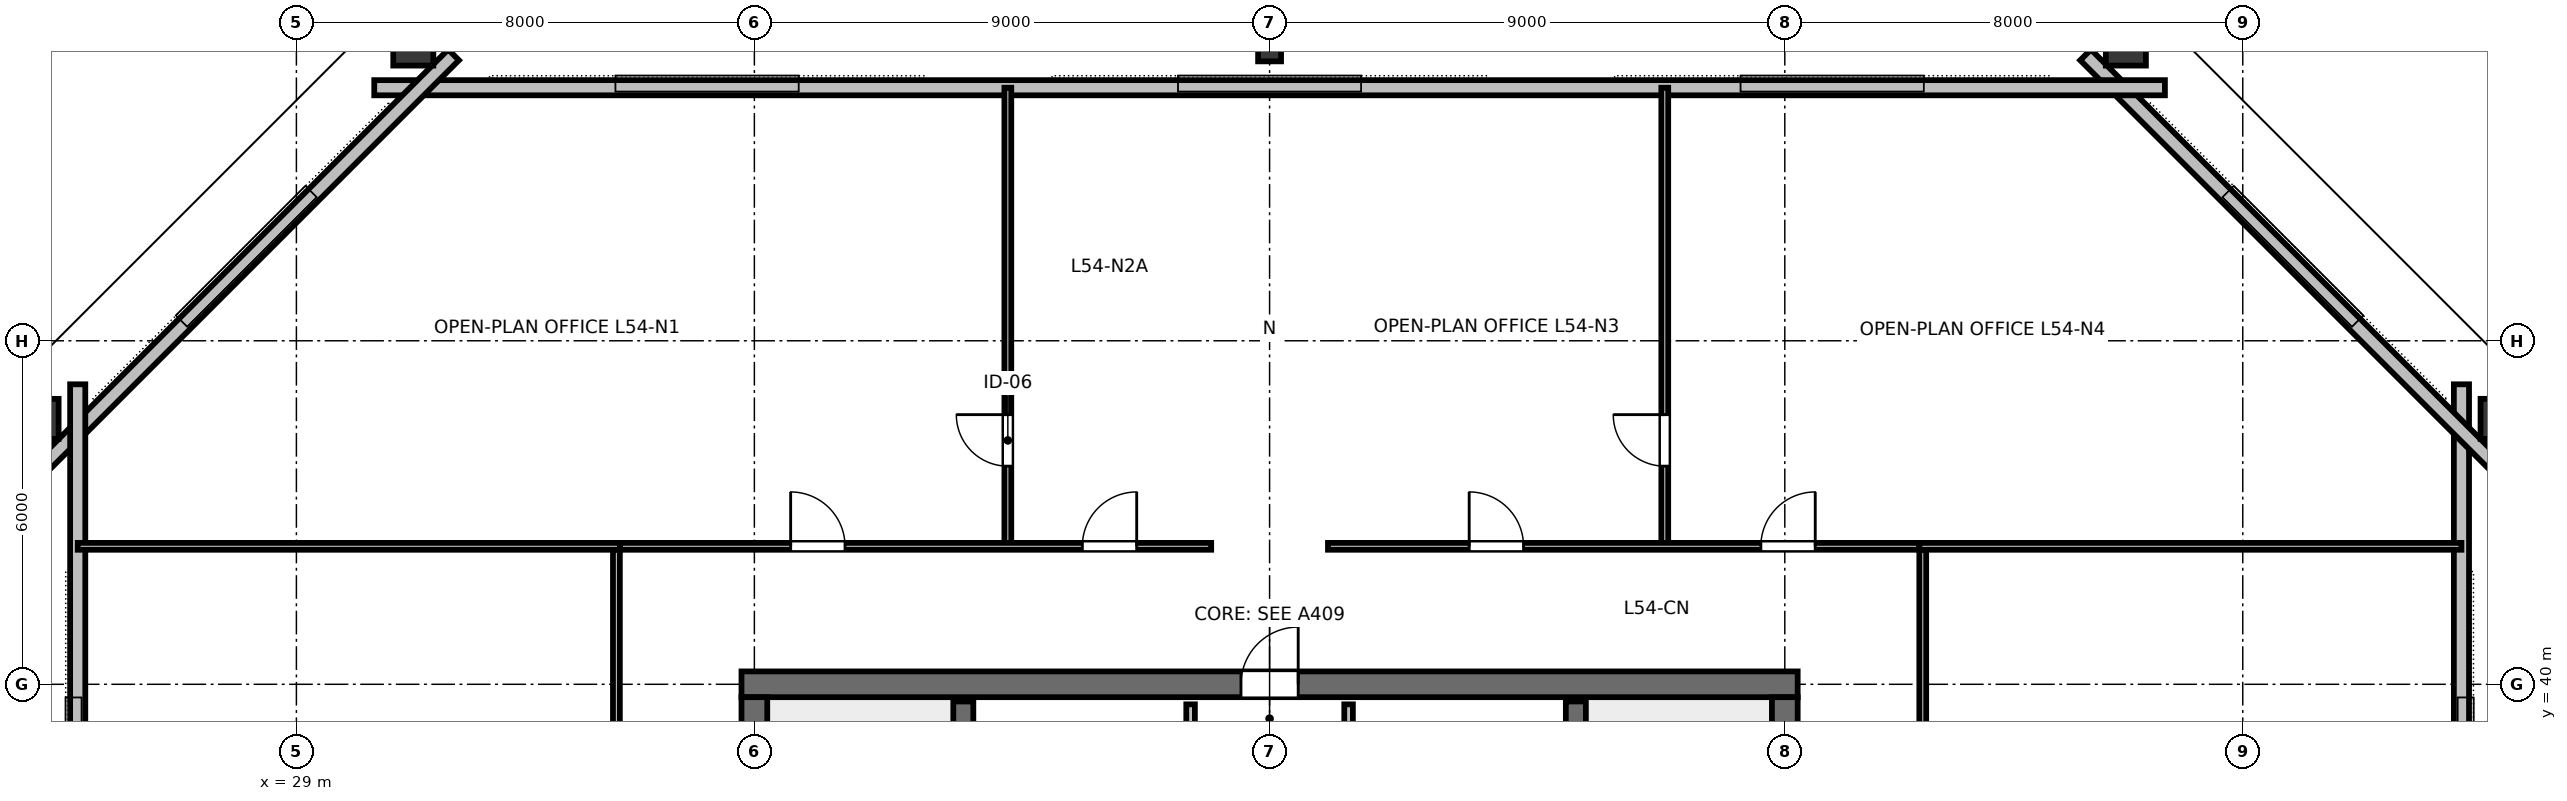
"""IFC4 building model, lengths in metres.
Left out: names, types, materials, properties, quantities, classifications, styles, units other than length and angle.
Written with IfcOpenShell. Run it as: python <this file> out.ifc"""

import sys

from ifc_helpers import new_model, si_unit, direction, frame, frame_2d, origin, origin_2d, place, context, subcontext, project, spatial, rectangle, hollow_rectangle, i_section, extrude, element, fill, save


model = new_model("IFC4")
c1 = context("Model", 3, precision=1e-05, world=origin(), true_north=direction((0.0, 1.0)))
c2 = subcontext(c1, "Body", "Model", "MODEL_VIEW")
j1 = project(units=[si_unit("LENGTHUNIT", "METRE"), si_unit("PLANEANGLEUNIT", "RADIAN")], contexts=[c1])
p1 = place(None, origin())
s1 = spatial("IfcSite", under=j1, at=p1, CompositionType="ELEMENT")
p2 = place(p1, origin())
s2 = spatial("IfcBuilding", under=s1, at=p2, CompositionType="ELEMENT")
p3 = place(p2, frame((0.0, 0.0, 205.8)))
s3 = spatial("IfcBuildingStorey", under=s2, at=p3, CompositionType="ELEMENT", Elevation=205.8)
p4 = place(p3, frame((36.775, 40.0, 0.0), z_axis=(0.0, 0.0, 1.0), x_axis=(1.0, 0.0, 0.0)))
e1 = element("IfcWall", 1, at=p4, inside=s3, PredefinedType="SHEAR", context=c2, shape_type="SweptSolid", body=[
    extrude(rectangle(XDim=18.45, YDim=0.45, at=frame_2d((9.225, 0.0))), origin(), (0.0, 0.0, 1.0), 3.36),
])
p5 = place(p4, frame((8.725, 0.0, 0.0)))
e2 = element("IfcOpeningElement", 2, at=p5, cuts=e1, PredefinedType="OPENING", context=c2, shape_type="SweptSolid", body=[
    extrude(rectangle(XDim=1.0, YDim=2.15, at=frame_2d((0.5, 1.075))), frame((0.0, 0.235, 0.0), z_axis=(0.0, -1.0, 0.0), x_axis=(1.0, 0.0, 0.0)), (0.0, 0.0, 1.0), 0.47),
])
p6 = place(p3, frame((37.0, 24.225, 0.0), z_axis=(0.0, 0.0, 1.0), x_axis=(0.0, 1.0, 0.0)))
e3 = element("IfcWall", 3, at=p6, inside=s3, PredefinedType="SHEAR", context=c2, shape_type="SweptSolid", body=[
    extrude(rectangle(XDim=15.55, YDim=0.45, at=frame_2d((7.775, 0.0))), origin(), (0.0, 0.0, 1.0), 3.36),
])
p7 = place(p6, frame((5.3, 0.0, 0.0)))
e4 = element("IfcOpeningElement", 4, at=p7, cuts=e3, PredefinedType="OPENING", context=c2, shape_type="SweptSolid", body=[
    extrude(rectangle(XDim=1.15, YDim=2.15, at=frame_2d((0.575, 1.075))), frame((0.0, 0.235, 0.0), z_axis=(0.0, -1.0, 0.0), x_axis=(1.0, 0.0, 0.0)), (0.0, 0.0, 1.0), 0.47),
])
p8 = place(p3, frame((55.0, 24.225, 0.0), z_axis=(0.0, 0.0, 1.0), x_axis=(0.0, 1.0, 0.0)))
e5 = element("IfcWall", 5, at=p8, inside=s3, PredefinedType="SHEAR", context=c2, shape_type="SweptSolid", body=[
    extrude(rectangle(XDim=15.55, YDim=0.45, at=frame_2d((7.775, 0.0))), origin(), (0.0, 0.0, 1.0), 3.36),
])
p9 = place(p8, frame((5.3, 0.0, 0.0)))
e6 = element("IfcOpeningElement", 6, at=p9, cuts=e5, PredefinedType="OPENING", context=c2, shape_type="SweptSolid", body=[
    extrude(rectangle(XDim=1.15, YDim=2.15, at=frame_2d((0.575, 1.075))), frame((0.0, 0.235, 0.0), z_axis=(0.0, -1.0, 0.0), x_axis=(1.0, 0.0, 0.0)), (0.0, 0.0, 1.0), 0.47),
])
p10 = place(p3, frame((67.579, 44.636, 0.0), z_axis=(-0.177376248603, -0.15599544782, 0.971701130333), x_axis=(0.729664280034, 0.64171109164, 0.236213702628)))
e7 = element("IfcColumn", 7, at=p10, inside=s3, PredefinedType="COLUMN", context=c2, shape_type="SweptSolid", body=[
    extrude(hollow_rectangle(XDim=0.7, YDim=0.85, WallThickness=0.04, at=origin_2d()), origin(), (0.0, 0.0, 1.0), 3.471),
])
p11 = place(p3, frame((60.958, 51.232, 0.0), z_axis=(-0.205843312043, -0.127115794881, 0.970293824354), x_axis=(0.52542489629, -0.850839983992, 0.0)))
e8 = element("IfcColumn", 8, at=p11, inside=s3, PredefinedType="COLUMN", context=c2, shape_type="SweptSolid", body=[
    extrude(hollow_rectangle(XDim=0.7, YDim=0.85, WallThickness=0.04, at=origin_2d()), origin(), (0.0, 0.0, 1.0), 3.476),
])
p12 = place(p3, frame((46.0, 51.08, 0.0), z_axis=(0.0, -0.128344855493, 0.99172959927), x_axis=(1.0, 0.0, 0.0)))
e9 = element("IfcColumn", 9, at=p12, inside=s3, PredefinedType="COLUMN", context=c2, shape_type="SweptSolid", body=[
    extrude(i_section(OverallWidth=0.401, OverallDepth=0.399, WebThickness=0.025, FlangeThickness=0.04, FilletRadius=0.025, at=origin_2d()), origin(), (0.0, 0.0, 1.0), 3.401),
])
p13 = place(p3, frame((31.042, 51.232, 0.0), z_axis=(0.205843312043, -0.127115794881, 0.970293824354), x_axis=(0.52542489629, 0.850839983992, 0.0)))
e10 = element("IfcColumn", 10, at=p13, inside=s3, PredefinedType="COLUMN", context=c2, shape_type="SweptSolid", body=[
    extrude(hollow_rectangle(XDim=0.7, YDim=0.85, WallThickness=0.04, at=origin_2d()), origin(), (0.0, 0.0, 1.0), 3.476),
])
p14 = place(p3, frame((24.421, 44.636, 0.0), z_axis=(0.177376248603, -0.15599544782, 0.971701130333), x_axis=(-0.729664280034, 0.64171109164, 0.236213702628)))
e11 = element("IfcColumn", 11, at=p14, inside=s3, PredefinedType="COLUMN", context=c2, shape_type="SweptSolid", body=[
    extrude(hollow_rectangle(XDim=0.7, YDim=0.85, WallThickness=0.04, at=origin_2d()), origin(), (0.0, 0.0, 1.0), 3.471),
])
p15 = place(p3, frame((66.82, 18.76, 0.0), z_axis=(0.0, 0.0, 1.0), x_axis=(0.0, 1.0, 0.0)))
e12 = element("IfcWall", 12, at=p15, inside=s3, PredefinedType="STANDARD", context=c2, shape_type="SweptSolid", body=[
    extrude(rectangle(XDim=26.48, YDim=0.265, at=frame_2d((13.24, 0.0))), origin(), (0.0, 0.0, 1.0), 2.832),
])
p16 = place(p3, frame((67.394, 43.854, 0.0), z_axis=(0.0, 0.0, 1.0), x_axis=(-0.707106781187, 0.707106781187, 0.0)))
e13 = element("IfcWall", 13, at=p16, inside=s3, PredefinedType="STANDARD", context=c2, shape_type="SweptSolid", body=[
    extrude(rectangle(XDim=10.097, YDim=0.265, at=frame_2d((5.048, 0.0))), origin(), (0.0, 0.0, 1.0), 2.832),
])
p17 = place(p3, frame((61.64, 50.42, 0.0), z_axis=(0.0, 0.0, 1.0), x_axis=(-1.0, 0.0, 0.0)))
e14 = element("IfcWall", 14, at=p17, inside=s3, PredefinedType="STANDARD", context=c2, shape_type="SweptSolid", body=[
    extrude(rectangle(XDim=31.28, YDim=0.265, at=frame_2d((15.64, 0.0))), origin(), (0.0, 0.0, 1.0), 2.832),
])
p18 = place(p3, frame((31.746, 50.994, 0.0), z_axis=(0.0, 0.0, 1.0), x_axis=(-0.707106781187, -0.707106781187, 0.0)))
e15 = element("IfcWall", 15, at=p18, inside=s3, PredefinedType="STANDARD", context=c2, shape_type="SweptSolid", body=[
    extrude(rectangle(XDim=10.097, YDim=0.265, at=frame_2d((5.048, 0.0))), origin(), (0.0, 0.0, 1.0), 2.832),
])
p19 = place(p3, frame((25.18, 45.24, 0.0), z_axis=(0.0, 0.0, 1.0), x_axis=(0.0, -1.0, 0.0)))
e16 = element("IfcWall", 16, at=p19, inside=s3, PredefinedType="STANDARD", context=c2, shape_type="SweptSolid", body=[
    extrude(rectangle(XDim=26.48, YDim=0.265, at=frame_2d((13.24, 0.0))), origin(), (0.0, 0.0, 1.0), 2.832),
])
for number, where, z_axis, x_axis in (
    (17, (40.65, 32.0, 0.0), (0.0, 0.0, 1.0), (0.0, 1.0, 0.0)),
    (18, (51.35, 32.0, 0.0), (0.0, 0.0, 1.0), (0.0, 1.0, 0.0)),
):
    element("IfcWall", number, at=place(p3, frame(where, z_axis=z_axis, x_axis=x_axis)), inside=s3, PredefinedType="SHEAR", context=c2, shape_type="SweptSolid", body=[
        extrude(rectangle(XDim=7.7, YDim=0.35, at=frame_2d((3.85, 0.0))), origin(), (0.0, 0.0, 1.0), 3.6),
    ])
p20 = place(p3, frame((44.62, 35.72, 0.0), z_axis=(0.0, 0.0, 1.0), x_axis=(0.0, 1.0, 0.0)))
e19 = element("IfcWall", 19, at=p20, inside=s3, PredefinedType="PARTITIONING", context=c2, shape_type="SweptSolid", body=[
    extrude(rectangle(XDim=3.93, YDim=0.15, at=frame_2d((1.965, 0.0))), origin(), (0.0, 0.0, 1.0), 3.375),
])
p21 = place(p20, frame((1.5, 0.0, 0.0)))
e20 = element("IfcOpeningElement", 20, at=p21, cuts=e19, PredefinedType="OPENING", context=c2, shape_type="SweptSolid", body=[
    extrude(rectangle(XDim=0.9, YDim=2.15, at=frame_2d((0.45, 1.075))), frame((0.0, 0.085, 0.0), z_axis=(0.0, -1.0, 0.0), x_axis=(1.0, 0.0, 0.0)), (0.0, 0.0, 1.0), 0.17),
])
p22 = place(p3, frame((47.38, 35.72, 0.0), z_axis=(0.0, 0.0, 1.0), x_axis=(0.0, 1.0, 0.0)))
e21 = element("IfcWall", 21, at=p22, inside=s3, PredefinedType="PARTITIONING", context=c2, shape_type="SweptSolid", body=[
    extrude(rectangle(XDim=3.93, YDim=0.15, at=frame_2d((1.965, 0.0))), origin(), (0.0, 0.0, 1.0), 3.375),
])
p23 = place(p22, frame((1.5, 0.0, 0.0)))
e22 = element("IfcOpeningElement", 22, at=p23, cuts=e21, PredefinedType="OPENING", context=c2, shape_type="SweptSolid", body=[
    extrude(rectangle(XDim=0.9, YDim=2.15, at=frame_2d((0.45, 1.075))), frame((0.0, 0.085, 0.0), z_axis=(0.0, -1.0, 0.0), x_axis=(1.0, 0.0, 0.0)), (0.0, 0.0, 1.0), 0.17),
])
p24 = place(p3, frame((41.428, 42.41, 0.0), z_axis=(0.0, 0.0, 1.0), x_axis=(0.0, 1.0, 0.0)))
e23 = element("IfcWall", 23, at=p24, inside=s3, PredefinedType="PARTITIONING", context=c2, shape_type="SweptSolid", body=[
    extrude(rectangle(XDim=8.01, YDim=0.12, at=frame_2d((4.005, 0.0))), origin(), (0.0, 0.0, 1.0), 2.655),
])
p25 = place(p24, frame((1.4, 0.0, 0.0)))
e24 = element("IfcOpeningElement", 24, at=p25, cuts=e23, PredefinedType="OPENING", context=c2, shape_type="SweptSolid", body=[
    extrude(rectangle(XDim=0.9, YDim=2.15, at=frame_2d((0.45, 1.075))), frame((0.0, 0.07, 0.0), z_axis=(0.0, -1.0, 0.0), x_axis=(1.0, 0.0, 0.0)), (0.0, 0.0, 1.0), 0.14),
])
p26 = place(p3, frame((52.903, 42.41, 0.0), z_axis=(0.0, 0.0, 1.0), x_axis=(0.0, 1.0, 0.0)))
e25 = element("IfcWall", 25, at=p26, inside=s3, PredefinedType="PARTITIONING", context=c2, shape_type="SweptSolid", body=[
    extrude(rectangle(XDim=8.01, YDim=0.12, at=frame_2d((4.005, 0.0))), origin(), (0.0, 0.0, 1.0), 2.655),
])
p27 = place(p26, frame((1.4, 0.0, 0.0)))
e26 = element("IfcOpeningElement", 26, at=p27, cuts=e25, PredefinedType="OPENING", context=c2, shape_type="SweptSolid", body=[
    extrude(rectangle(XDim=0.9, YDim=2.15, at=frame_2d((0.45, 1.075))), frame((0.0, 0.07, 0.0), z_axis=(0.0, -1.0, 0.0), x_axis=(1.0, 0.0, 0.0)), (0.0, 0.0, 1.0), 0.14),
])
p28 = place(p3, frame((34.65, 42.41, 0.0), z_axis=(0.0, 0.0, 1.0), x_axis=(1.0, 0.0, 0.0)))
e27 = element("IfcWall", 27, at=p28, inside=s3, PredefinedType="PARTITIONING", context=c2, shape_type="SweptSolid", body=[
    extrude(rectangle(XDim=10.33, YDim=0.12, at=frame_2d((5.165, 0.0))), origin(), (0.0, 0.0, 1.0), 2.655),
])
p29 = place(p28, frame((2.984, 0.0, 0.0)))
e28 = element("IfcOpeningElement", 28, at=p29, cuts=e27, PredefinedType="OPENING", context=c2, shape_type="SweptSolid", body=[
    extrude(rectangle(XDim=0.95, YDim=2.15, at=frame_2d((0.475, 1.075))), frame((0.0, 0.07, 0.0), z_axis=(0.0, -1.0, 0.0), x_axis=(1.0, 0.0, 0.0)), (0.0, 0.0, 1.0), 0.14),
])
p30 = place(p28, frame((8.079, 0.0, 0.0)))
e29 = element("IfcOpeningElement", 29, at=p30, cuts=e27, PredefinedType="OPENING", context=c2, shape_type="SweptSolid", body=[
    extrude(rectangle(XDim=0.95, YDim=2.15, at=frame_2d((0.475, 1.075))), frame((0.0, 0.07, 0.0), z_axis=(0.0, -1.0, 0.0), x_axis=(1.0, 0.0, 0.0)), (0.0, 0.0, 1.0), 0.14),
])
p31 = place(p3, frame((47.02, 42.41, 0.0), z_axis=(0.0, 0.0, 1.0), x_axis=(1.0, 0.0, 0.0)))
e30 = element("IfcWall", 30, at=p31, inside=s3, PredefinedType="PARTITIONING", context=c2, shape_type="SweptSolid", body=[
    extrude(rectangle(XDim=10.33, YDim=0.12, at=frame_2d((5.165, 0.0))), origin(), (0.0, 0.0, 1.0), 2.655),
])
p32 = place(p31, frame((2.467, 0.0, 0.0)))
e31 = element("IfcOpeningElement", 31, at=p32, cuts=e30, PredefinedType="OPENING", context=c2, shape_type="SweptSolid", body=[
    extrude(rectangle(XDim=0.95, YDim=2.15, at=frame_2d((0.475, 1.075))), frame((0.0, 0.07, 0.0), z_axis=(0.0, -1.0, 0.0), x_axis=(1.0, 0.0, 0.0)), (0.0, 0.0, 1.0), 0.14),
])
p33 = place(p31, frame((7.562, 0.0, 0.0)))
e32 = element("IfcOpeningElement", 32, at=p33, cuts=e30, PredefinedType="OPENING", context=c2, shape_type="SweptSolid", body=[
    extrude(rectangle(XDim=0.95, YDim=2.15, at=frame_2d((0.475, 1.075))), frame((0.0, 0.07, 0.0), z_axis=(0.0, -1.0, 0.0), x_axis=(1.0, 0.0, 0.0)), (0.0, 0.0, 1.0), 0.14),
])
p34 = place(p3, frame((34.59, 21.65, 0.0), z_axis=(0.0, 0.0, 1.0), x_axis=(0.0, 1.0, 0.0)))
e33 = element("IfcWall", 33, at=p34, inside=s3, PredefinedType="PARTITIONING", context=c2, shape_type="SweptSolid", body=[
    extrude(rectangle(XDim=20.7, YDim=0.12, at=frame_2d((10.35, 0.0))), origin(), (0.0, 0.0, 1.0), 2.655),
])
p35 = place(p34, frame((2.698, 0.0, 0.0)))
e34 = element("IfcOpeningElement", 34, at=p35, cuts=e33, PredefinedType="OPENING", context=c2, shape_type="SweptSolid", body=[
    extrude(rectangle(XDim=0.95, YDim=2.15, at=frame_2d((0.475, 1.075))), frame((0.0, 0.07, 0.0), z_axis=(0.0, -1.0, 0.0), x_axis=(1.0, 0.0, 0.0)), (0.0, 0.0, 1.0), 0.14),
])
p36 = place(p34, frame((8.556, 0.0, 0.0)))
e35 = element("IfcOpeningElement", 35, at=p36, cuts=e33, PredefinedType="OPENING", context=c2, shape_type="SweptSolid", body=[
    extrude(rectangle(XDim=0.95, YDim=2.15, at=frame_2d((0.475, 1.075))), frame((0.0, 0.07, 0.0), z_axis=(0.0, -1.0, 0.0), x_axis=(1.0, 0.0, 0.0)), (0.0, 0.0, 1.0), 0.14),
])
p37 = place(p34, frame((15.733, 0.0, 0.0)))
e36 = element("IfcOpeningElement", 36, at=p37, cuts=e33, PredefinedType="OPENING", context=c2, shape_type="SweptSolid", body=[
    extrude(rectangle(XDim=0.95, YDim=2.15, at=frame_2d((0.475, 1.075))), frame((0.0, 0.07, 0.0), z_axis=(0.0, -1.0, 0.0), x_axis=(1.0, 0.0, 0.0)), (0.0, 0.0, 1.0), 0.14),
])
p38 = place(p3, frame((57.41, 21.65, 0.0), z_axis=(0.0, 0.0, 1.0), x_axis=(0.0, 1.0, 0.0)))
e37 = element("IfcWall", 37, at=p38, inside=s3, PredefinedType="PARTITIONING", context=c2, shape_type="SweptSolid", body=[
    extrude(rectangle(XDim=20.7, YDim=0.12, at=frame_2d((10.35, 0.0))), origin(), (0.0, 0.0, 1.0), 2.655),
])
p39 = place(p38, frame((5.525, 0.0, 0.0)))
e38 = element("IfcOpeningElement", 38, at=p39, cuts=e37, PredefinedType="OPENING", context=c2, shape_type="SweptSolid", body=[
    extrude(rectangle(XDim=0.95, YDim=2.15, at=frame_2d((0.475, 1.075))), frame((0.0, 0.07, 0.0), z_axis=(0.0, -1.0, 0.0), x_axis=(1.0, 0.0, 0.0)), (0.0, 0.0, 1.0), 0.14),
])
p40 = place(p38, frame((15.675, 0.0, 0.0)))
e39 = element("IfcOpeningElement", 39, at=p40, cuts=e37, PredefinedType="OPENING", context=c2, shape_type="SweptSolid", body=[
    extrude(rectangle(XDim=0.95, YDim=2.15, at=frame_2d((0.475, 1.075))), frame((0.0, 0.07, 0.0), z_axis=(0.0, -1.0, 0.0), x_axis=(1.0, 0.0, 0.0)), (0.0, 0.0, 1.0), 0.14),
])
for number, where, z_axis, x_axis in (
    (40, (34.65, 42.41, 0.0), (0.0, 0.0, 1.0), (-1.0, 0.0, 0.0)),
    (41, (57.35, 42.41, 0.0), (0.0, 0.0, 1.0), (1.0, 0.0, 0.0)),
):
    element("IfcWall", number, at=place(p3, frame(where, z_axis=z_axis, x_axis=x_axis)), inside=s3, PredefinedType="PARTITIONING", context=c2, shape_type="SweptSolid", body=[
        extrude(rectangle(XDim=9.47, YDim=0.12, at=frame_2d((4.735, 0.0))), origin(), (0.0, 0.0, 1.0), 2.655),
    ])
p41 = place(p5, origin())
e42 = element("IfcDoor", 42, at=p41, inside=s3, OperationType="SINGLE_SWING_RIGHT", PredefinedType="DOOR", context=c2, shape_type="SweptSolid", body=[
    extrude(rectangle(XDim=1.0, YDim=2.15, at=frame_2d((0.5, 1.075))), frame((0.0, 0.025, 0.0), z_axis=(0.0, -1.0, 0.0), x_axis=(1.0, 0.0, 0.0)), (0.0, 0.0, 1.0), 0.05),
])
fill(e2, e42)
p42 = place(p25, origin())
e43 = element("IfcDoor", 43, at=p42, inside=s3, OperationType="SINGLE_SWING_RIGHT", PredefinedType="DOOR", context=c2, shape_type="SweptSolid", body=[
    extrude(rectangle(XDim=0.9, YDim=2.15, at=frame_2d((0.45, 1.075))), frame((0.0, 0.025, 0.0), z_axis=(0.0, -1.0, 0.0), x_axis=(1.0, 0.0, 0.0)), (0.0, 0.0, 1.0), 0.05),
])
fill(e24, e43)
p43 = place(p27, origin())
e44 = element("IfcDoor", 44, at=p43, inside=s3, OperationType="SINGLE_SWING_RIGHT", PredefinedType="DOOR", context=c2, shape_type="SweptSolid", body=[
    extrude(rectangle(XDim=0.9, YDim=2.15, at=frame_2d((0.45, 1.075))), frame((0.0, 0.025, 0.0), z_axis=(0.0, -1.0, 0.0), x_axis=(1.0, 0.0, 0.0)), (0.0, 0.0, 1.0), 0.05),
])
fill(e26, e44)
p44 = place(p29, origin())
e45 = element("IfcDoor", 45, at=p44, inside=s3, OperationType="SINGLE_SWING_LEFT", PredefinedType="DOOR", context=c2, shape_type="SweptSolid", body=[
    extrude(rectangle(XDim=0.95, YDim=2.15, at=frame_2d((0.475, 1.075))), frame((0.0, 0.025, 0.0), z_axis=(0.0, -1.0, 0.0), x_axis=(1.0, 0.0, 0.0)), (0.0, 0.0, 1.0), 0.05),
])
fill(e28, e45)
p45 = place(p30, origin())
e46 = element("IfcDoor", 46, at=p45, inside=s3, OperationType="SINGLE_SWING_RIGHT", PredefinedType="DOOR", context=c2, shape_type="SweptSolid", body=[
    extrude(rectangle(XDim=0.95, YDim=2.15, at=frame_2d((0.475, 1.075))), frame((0.0, 0.025, 0.0), z_axis=(0.0, -1.0, 0.0), x_axis=(1.0, 0.0, 0.0)), (0.0, 0.0, 1.0), 0.05),
])
fill(e29, e46)
p46 = place(p32, origin())
e47 = element("IfcDoor", 47, at=p46, inside=s3, OperationType="SINGLE_SWING_LEFT", PredefinedType="DOOR", context=c2, shape_type="SweptSolid", body=[
    extrude(rectangle(XDim=0.95, YDim=2.15, at=frame_2d((0.475, 1.075))), frame((0.0, 0.025, 0.0), z_axis=(0.0, -1.0, 0.0), x_axis=(1.0, 0.0, 0.0)), (0.0, 0.0, 1.0), 0.05),
])
fill(e31, e47)
p47 = place(p33, origin())
e48 = element("IfcDoor", 48, at=p47, inside=s3, OperationType="SINGLE_SWING_RIGHT", PredefinedType="DOOR", context=c2, shape_type="SweptSolid", body=[
    extrude(rectangle(XDim=0.95, YDim=2.15, at=frame_2d((0.475, 1.075))), frame((0.0, 0.025, 0.0), z_axis=(0.0, -1.0, 0.0), x_axis=(1.0, 0.0, 0.0)), (0.0, 0.0, 1.0), 0.05),
])
fill(e32, e48)
save(model, sys.argv[1])
